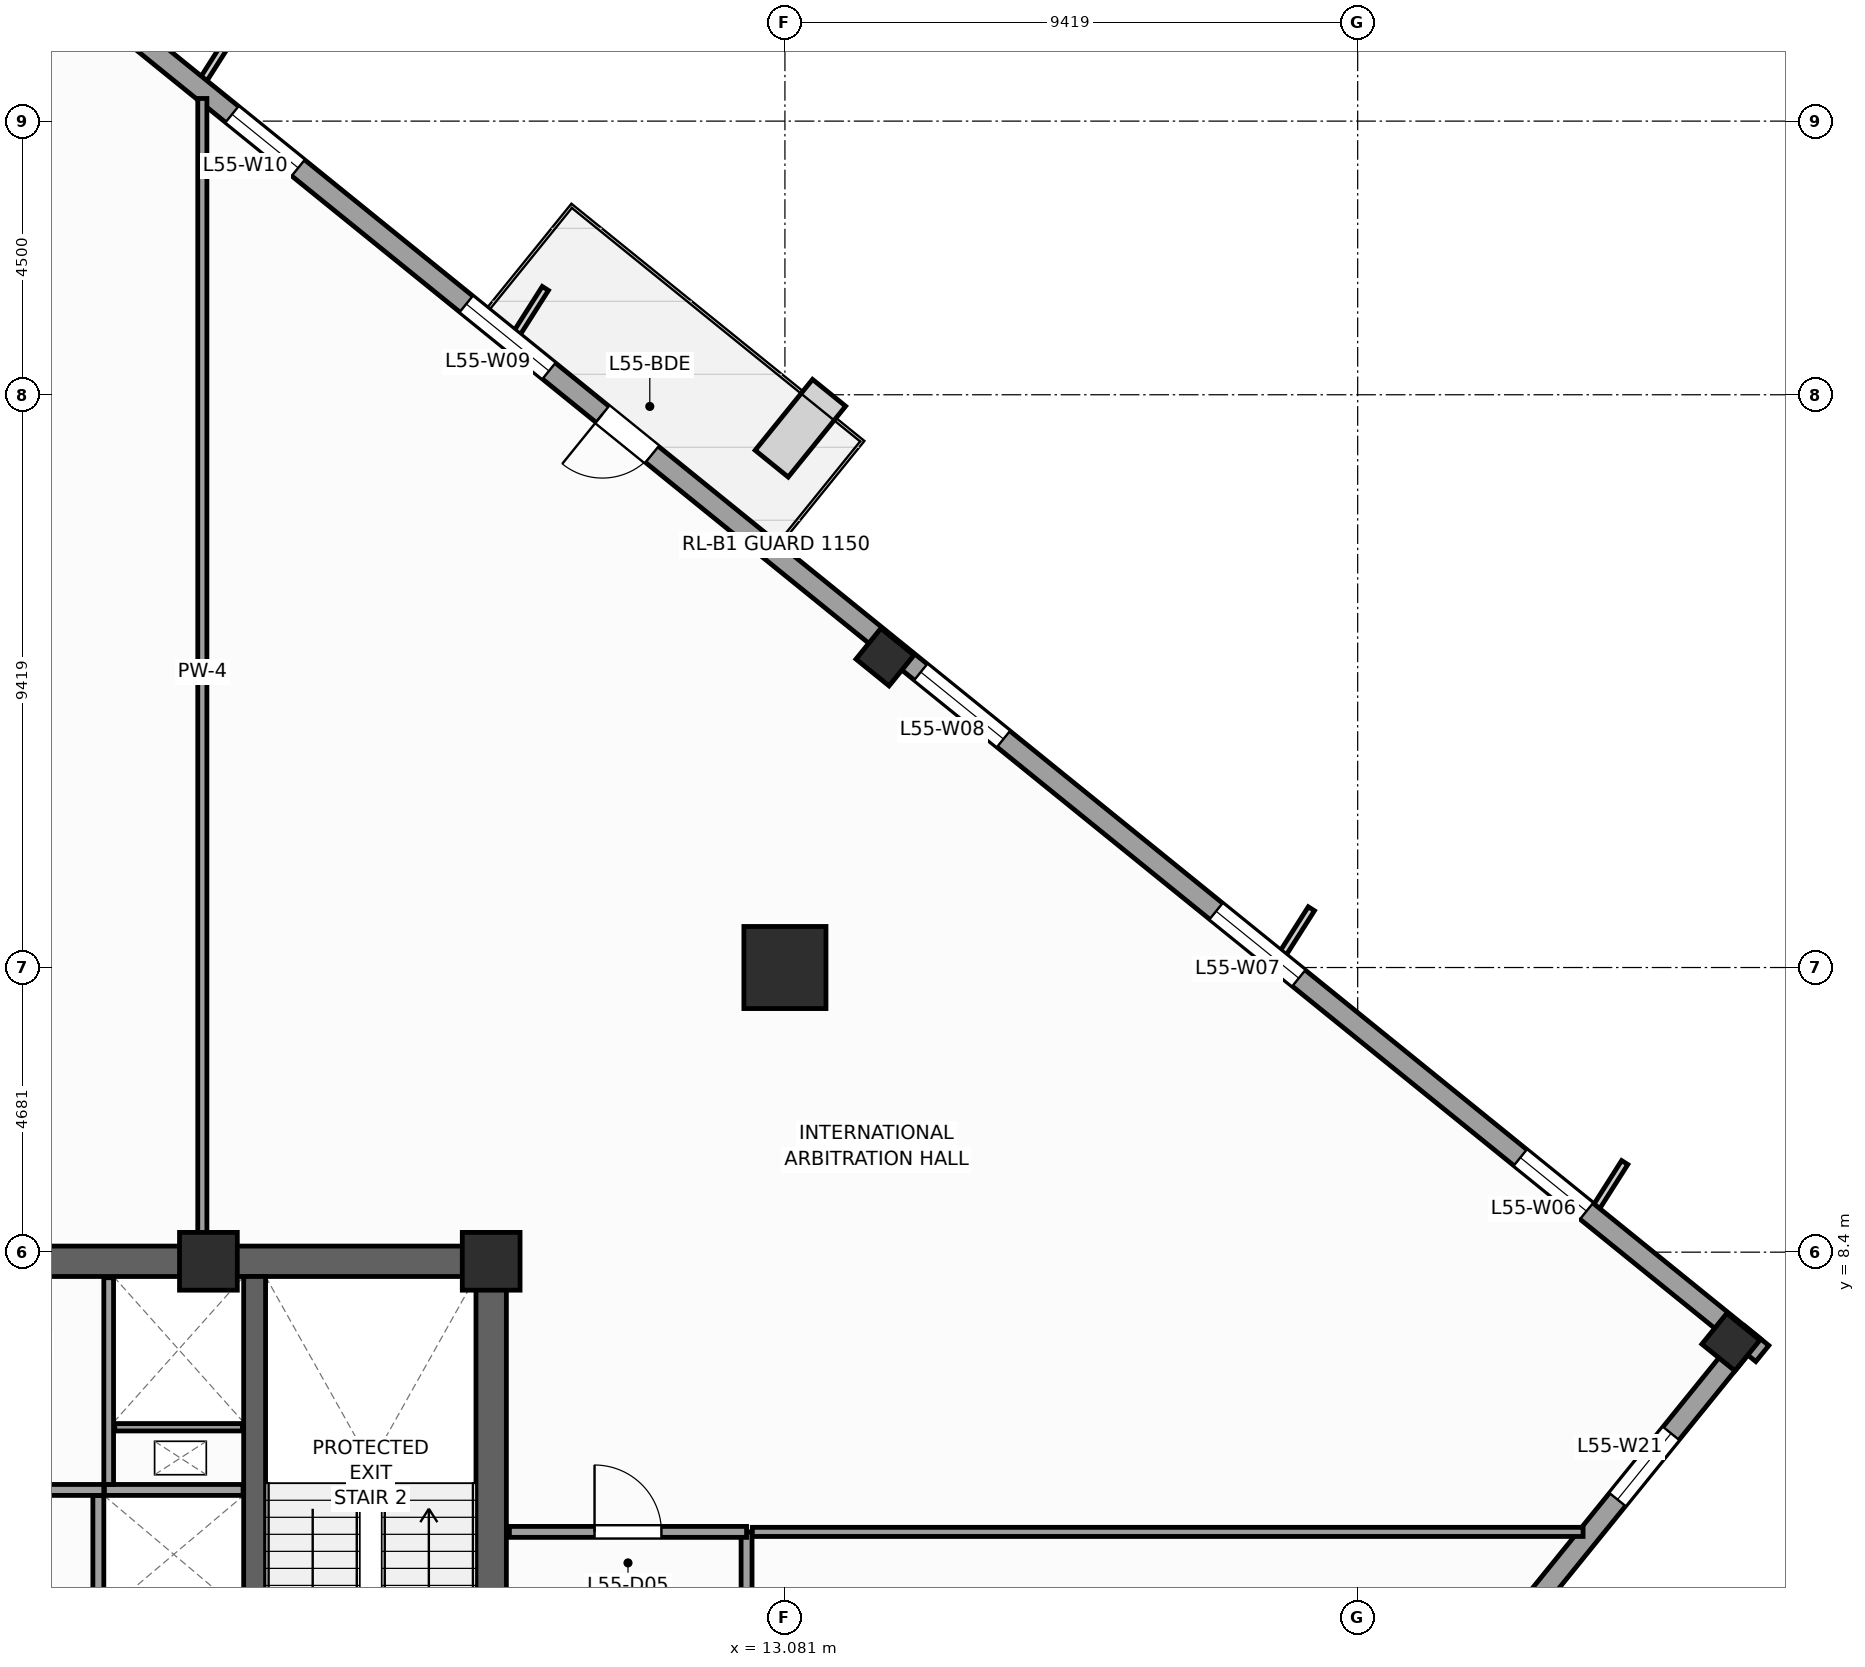
"""IFC4 building model, lengths in metres.
Left out: names, types, materials, properties, quantities, classifications, styles, units other than length and angle.
Written with IfcOpenShell. Run it as: python <this file> out.ifc"""

import sys

from ifc_helpers import new_model, si_unit, direction, frame, frame_2d, origin, origin_2d, place, context, subcontext, project, spatial, rectangle, extrude, source, transform, mapped, element, fill, save


model = new_model("IFC4")
c1 = context("Model", 3, precision=1e-05, world=origin(), true_north=direction((0.0, 1.0)))
c2 = subcontext(c1, "Body", "Model", "MODEL_VIEW")
j1 = project(units=[si_unit("LENGTHUNIT", "METRE"), si_unit("PLANEANGLEUNIT", "RADIAN")], contexts=[c1])
p1 = place(None, origin())
s1 = spatial("IfcSite", under=j1, at=p1, CompositionType="ELEMENT")
p2 = place(p1, origin())
s2 = spatial("IfcBuilding", under=s1, at=p2, CompositionType="ELEMENT")
p3 = place(p2, frame((0.0, 0.0, 229.0)))
s3 = spatial("IfcBuildingStorey", under=s2, at=p3, CompositionType="ELEMENT", Elevation=229.0)
p4 = place(p3, frame((-8.5, 8.25, 0.0), z_axis=(0.0, 0.0, 1.0), x_axis=(1.0, 0.0, 0.0)))
e1 = element("IfcWall", 1, at=p4, inside=s3, PredefinedType="SHEAR", context=c2, shape_type="SweptSolid", body=[
    extrude(rectangle(XDim=17.0, YDim=0.5, at=frame_2d((8.5, 0.0))), origin(), (0.0, 0.0, 1.0), 3.9),
])
p5 = place(p3, frame((8.25, -8.0, 0.0), z_axis=(0.0, 0.0, 1.0), x_axis=(0.0, 1.0, 0.0)))
e2 = element("IfcWall", 2, at=p5, inside=s3, PredefinedType="SHEAR", context=c2, shape_type="SweptSolid", body=[
    extrude(rectangle(XDim=16.0, YDim=0.5, at=frame_2d((8.0, 0.0))), origin(), (0.0, 0.0, 1.0), 3.9),
])
p6 = place(p5, frame((4.69, 0.0, 0.0)))
e3 = element("IfcOpeningElement", 3, at=p6, cuts=e2, PredefinedType="OPENING", context=c2, shape_type="SweptSolid", body=[
    extrude(rectangle(XDim=1.3, YDim=2.2, at=frame_2d((0.65, 1.1))), frame((0.0, 0.26, 0.0), z_axis=(0.0, -1.0, 0.0), x_axis=(1.0, 0.0, 0.0)), (0.0, 0.0, 1.0), 0.52),
])
p7 = place(p3, frame((4.36, -8.0, 0.0), z_axis=(0.0, 0.0, 1.0), x_axis=(0.0, 1.0, 0.0)))
e4 = element("IfcWall", 4, at=p7, inside=s3, PredefinedType="SHEAR", context=c2, shape_type="SweptSolid", body=[
    extrude(rectangle(XDim=16.0, YDim=0.36, at=frame_2d((8.0, 0.0))), origin(), (0.0, 0.0, 1.0), 3.9),
])
m1 = source(origin(), c2, "Body", "SweptSolid", [
    extrude(rectangle(XDim=0.95, YDim=0.95, at=origin_2d()), origin(), (0.0, 0.0, 1.0), 3.9),
])
for number, where, z_axis, x_axis in (
    (5, (8.25, 8.25, 0.0), (0.0, 0.0, 1.0), (1.0, 0.0, 0.0)),
    (6, (3.6, 8.25, 0.0), (0.0, 0.0, 1.0), (1.0, 0.0, 0.0)),
):
    element("IfcColumn", number, at=place(p3, frame(where, z_axis=z_axis, x_axis=x_axis)), inside=s3, PredefinedType="PILASTER", context=c2, shape_type="MappedRepresentation", body=[
        mapped(m1, transform((0.0, 0.0, 0.0), scale=1.0)),
    ])
m2 = source(origin(), c2, "Body", "SweptSolid", [
    extrude(rectangle(XDim=1.35, YDim=1.35, at=origin_2d()), origin(), (0.0, 0.0, 1.0), 3.9),
])
p8 = place(p3, frame((13.081, 13.081, 0.0), z_axis=(0.0, 0.0, 1.0), x_axis=(1.0, 0.0, 0.0)))
e7 = element("IfcColumn", 7, at=p8, inside=s3, PredefinedType="COLUMN", context=c2, shape_type="MappedRepresentation", body=[
    mapped(m2, transform((0.0, 0.0, 0.0), scale=1.0)),
])
m3 = source(origin(), c2, "Body", "SweptSolid", [
    extrude(rectangle(XDim=0.65, YDim=0.7, at=origin_2d()), origin(), (0.0, 0.0, 1.0), 3.9),
])
for number, where, z_axis, x_axis in (
    (8, (28.637, 6.92, 0.0), (0.0, 0.0, 1.0), (0.629, 0.777, 0.0)),
    (9, (14.726, 18.185, 0.0), (0.0, 0.0, 1.0), (0.629, 0.777, 0.0)),
):
    element("IfcColumn", number, at=place(p3, frame(where, z_axis=z_axis, x_axis=x_axis)), inside=s3, PredefinedType="COLUMN", context=c2, shape_type="MappedRepresentation", body=[
        mapped(m3, transform((0.0, 0.0, 0.0), scale=1.0)),
    ])
p9 = place(p3, frame((25.429, 2.673, 0.0), z_axis=(0.0, 0.0, 1.0), x_axis=(0.629299794138, 0.777162640055, 0.0)))
e10 = element("IfcWall", 10, at=p9, inside=s3, PredefinedType="STANDARD", context=c2, shape_type="SweptSolid", body=[
    extrude(rectangle(XDim=5.67, YDim=0.34, at=frame_2d((2.835, 0.0))), origin(), (0.0, 0.0, 1.0), 3.66),
])
p10 = place(p9, frame((2.135, 0.0, 0.48)))
e11 = element("IfcOpeningElement", 11, at=p10, cuts=e10, PredefinedType="OPENING", context=c2, shape_type="SweptSolid", body=[
    extrude(rectangle(XDim=1.4, YDim=2.4, at=frame_2d((0.7, 1.2))), frame((0.0, 0.18, 0.0), z_axis=(0.0, -1.0, 0.0), x_axis=(1.0, 0.0, 0.0)), (0.0, 0.0, 1.0), 0.36),
])
p11 = place(p3, frame((29.154, 6.733, 0.0), z_axis=(0.0, 0.0, 1.0), x_axis=(-0.77714192302, 0.629325378072, 0.0)))
e12 = element("IfcWall", 12, at=p11, inside=s3, PredefinedType="STANDARD", context=c2, shape_type="SweptSolid", body=[
    extrude(rectangle(XDim=36.84, YDim=0.34, at=frame_2d((18.42, 0.0))), origin(), (0.0, 0.0, 1.0), 2.96),
])
p12 = place(p11, frame((23.495, 0.0, 0.0)))
e13 = element("IfcOpeningElement", 13, at=p12, cuts=e12, PredefinedType="OPENING", context=c2, shape_type="SweptSolid", body=[
    extrude(rectangle(XDim=1.05, YDim=2.25, at=frame_2d((0.525, 1.125))), frame((0.0, 0.18, 0.0), z_axis=(0.0, -1.0, 0.0), x_axis=(1.0, 0.0, 0.0)), (0.0, 0.0, 1.0), 0.36),
])
p13 = place(p11, frame((3.721, 0.0, 0.48)))
e14 = element("IfcOpeningElement", 14, at=p13, cuts=e12, PredefinedType="OPENING", context=c2, shape_type="SweptSolid", body=[
    extrude(rectangle(XDim=1.4, YDim=2.4, at=frame_2d((0.7, 1.2))), frame((0.0, 0.18, 0.0), z_axis=(0.0, -1.0, 0.0), x_axis=(1.0, 0.0, 0.0)), (0.0, 0.0, 1.0), 0.36),
])
p14 = place(p11, frame((9.809, 0.0, 0.58)))
e15 = element("IfcOpeningElement", 15, at=p14, cuts=e12, PredefinedType="OPENING", context=c2, shape_type="SweptSolid", body=[
    extrude(rectangle(XDim=1.75, YDim=2.3, at=frame_2d((0.875, 1.15))), frame((0.0, 0.18, 0.0), z_axis=(0.0, -1.0, 0.0), x_axis=(1.0, 0.0, 0.0)), (0.0, 0.0, 1.0), 0.36),
])
p15 = place(p11, frame((16.058, 0.0, 0.58)))
e16 = element("IfcOpeningElement", 16, at=p15, cuts=e12, PredefinedType="OPENING", context=c2, shape_type="SweptSolid", body=[
    extrude(rectangle(XDim=1.75, YDim=2.3, at=frame_2d((0.875, 1.15))), frame((0.0, 0.18, 0.0), z_axis=(0.0, -1.0, 0.0), x_axis=(1.0, 0.0, 0.0)), (0.0, 0.0, 1.0), 0.36),
])
p16 = place(p11, frame((25.676, 0.0, 0.58)))
e17 = element("IfcOpeningElement", 17, at=p16, cuts=e12, PredefinedType="OPENING", context=c2, shape_type="SweptSolid", body=[
    extrude(rectangle(XDim=1.75, YDim=2.3, at=frame_2d((0.875, 1.15))), frame((0.0, 0.18, 0.0), z_axis=(0.0, -1.0, 0.0), x_axis=(1.0, 0.0, 0.0)), (0.0, 0.0, 1.0), 0.36),
])
p17 = place(p11, frame((30.982, 0.0, 0.48)))
e18 = element("IfcOpeningElement", 18, at=p17, cuts=e12, PredefinedType="OPENING", context=c2, shape_type="SweptSolid", body=[
    extrude(rectangle(XDim=1.4, YDim=2.4, at=frame_2d((0.7, 1.2))), frame((0.0, 0.18, 0.0), z_axis=(0.0, -1.0, 0.0), x_axis=(1.0, 0.0, 0.0)), (0.0, 0.0, 1.0), 0.36),
])
p18 = place(p3, frame((1.79, -7.98, 0.0), z_axis=(0.0, 0.0, 1.0), x_axis=(0.0, 1.0, 0.0)))
e19 = element("IfcWall", 19, at=p18, inside=s3, PredefinedType="PARTITIONING", context=c2, shape_type="SweptSolid", body=[
    extrude(rectangle(XDim=12.38, YDim=0.18, at=frame_2d((6.19, 0.0))), origin(), (0.0, 0.0, 1.0), 3.66),
])
p19 = place(p18, frame((4.6, 0.0, 0.0)))
e20 = element("IfcOpeningElement", 20, at=p19, cuts=e19, PredefinedType="OPENING", context=c2, shape_type="SweptSolid", body=[
    extrude(rectangle(XDim=1.1, YDim=2.2, at=frame_2d((0.55, 1.1))), frame((0.0, 0.1, 0.0), z_axis=(0.0, -1.0, 0.0), x_axis=(1.0, 0.0, 0.0)), (0.0, 0.0, 1.0), 0.2),
])
p20 = place(p18, frame((6.66, 0.0, 0.0)))
e21 = element("IfcOpeningElement", 21, at=p20, cuts=e19, PredefinedType="OPENING", context=c2, shape_type="SweptSolid", body=[
    extrude(rectangle(XDim=1.1, YDim=2.2, at=frame_2d((0.55, 1.1))), frame((0.0, 0.1, 0.0), z_axis=(0.0, -1.0, 0.0), x_axis=(1.0, 0.0, 0.0)), (0.0, 0.0, 1.0), 0.2),
])
p21 = place(p18, frame((0.35, 0.0, 0.0)))
e22 = element("IfcOpeningElement", 22, at=p21, cuts=e19, PredefinedType="OPENING", context=c2, shape_type="SweptSolid", body=[
    extrude(rectangle(XDim=0.88, YDim=2.1, at=frame_2d((0.44, 1.05))), frame((0.0, 0.1, 0.0), z_axis=(0.0, -1.0, 0.0), x_axis=(1.0, 0.0, 0.0)), (0.0, 0.0, 1.0), 0.2),
])
p22 = place(p18, frame((2.25, 0.0, 0.0)))
e23 = element("IfcOpeningElement", 23, at=p22, cuts=e19, PredefinedType="OPENING", context=c2, shape_type="SweptSolid", body=[
    extrude(rectangle(XDim=1.15, YDim=2.25, at=frame_2d((0.575, 1.125))), frame((0.0, 0.1, 0.0), z_axis=(0.0, -1.0, 0.0), x_axis=(1.0, 0.0, 0.0)), (0.0, 0.0, 1.0), 0.2),
])
p23 = place(p3, frame((-1.88, 4.49, 0.0), z_axis=(0.0, 0.0, 1.0), x_axis=(1.0, 0.0, 0.0)))
e24 = element("IfcWall", 24, at=p23, inside=s3, PredefinedType="PARTITIONING", context=c2, shape_type="SweptSolid", body=[
    extrude(rectangle(XDim=3.76, YDim=0.18, at=frame_2d((1.88, 0.0))), origin(), (0.0, 0.0, 1.0), 3.66),
])
p24 = place(p23, frame((1.305, 0.0, 0.0)))
e25 = element("IfcOpeningElement", 25, at=p24, cuts=e24, PredefinedType="OPENING", context=c2, shape_type="SweptSolid", body=[
    extrude(rectangle(XDim=1.15, YDim=2.25, at=frame_2d((0.575, 1.125))), frame((0.0, 0.1, 0.0), z_axis=(0.0, -1.0, 0.0), x_axis=(1.0, 0.0, 0.0)), (0.0, 0.0, 1.0), 0.2),
])
p25 = place(p3, frame((1.89, 4.49, 0.0), z_axis=(0.0, 0.0, 1.0), x_axis=(1.0, 0.0, 0.0)))
e26 = element("IfcWall", 26, at=p25, inside=s3, PredefinedType="PARTITIONING", context=c2, shape_type="SweptSolid", body=[
    extrude(rectangle(XDim=2.28, YDim=0.18, at=frame_2d((1.14, 0.0))), origin(), (0.0, 0.0, 1.0), 3.66),
])
p26 = place(p3, frame((1.96, 4.58, 0.0), z_axis=(0.0, 0.0, 1.0), x_axis=(0.0, 1.0, 0.0)))
e27 = element("IfcWall", 27, at=p26, inside=s3, PredefinedType="PARTITIONING", context=c2, shape_type="SweptSolid", body=[
    extrude(rectangle(XDim=3.4, YDim=0.16, at=frame_2d((1.7, 0.0))), origin(), (0.0, 0.0, 1.0), 3.66),
])
p27 = place(p3, frame((2.06, 5.52, 0.0), z_axis=(0.0, 0.0, 1.0), x_axis=(1.0, 0.0, 0.0)))
e28 = element("IfcWall", 28, at=p27, inside=s3, PredefinedType="PARTITIONING", context=c2, shape_type="SweptSolid", body=[
    extrude(rectangle(XDim=2.1, YDim=0.12, at=frame_2d((1.05, 0.0))), origin(), (0.0, 0.0, 1.0), 3.66),
])
p28 = place(p3, frame((12.45, -12.35, 0.0), z_axis=(0.0, 0.0, 1.0), x_axis=(0.0, 1.0, 0.0)))
e29 = element("IfcWall", 29, at=p28, inside=s3, PredefinedType="PARTITIONING", context=c2, shape_type="SweptSolid", body=[
    extrude(rectangle(XDim=16.15, YDim=0.18, at=frame_2d((8.075, 0.0))), origin(), (0.0, 0.0, 1.0), 3.66),
])
p29 = place(p28, frame((1.58, 0.0, 0.0)))
e30 = element("IfcOpeningElement", 30, at=p29, cuts=e29, PredefinedType="OPENING", context=c2, shape_type="SweptSolid", body=[
    extrude(rectangle(XDim=0.95, YDim=2.1, at=frame_2d((0.475, 1.05))), frame((0.0, 0.1, 0.0), z_axis=(0.0, -1.0, 0.0), x_axis=(1.0, 0.0, 0.0)), (0.0, 0.0, 1.0), 0.2),
])
p30 = place(p28, frame((14.111, 0.0, 0.0)))
e31 = element("IfcOpeningElement", 31, at=p30, cuts=e29, PredefinedType="OPENING", context=c2, shape_type="SweptSolid", body=[
    extrude(rectangle(XDim=1.1, YDim=2.2, at=frame_2d((0.55, 1.1))), frame((0.0, 0.1, 0.0), z_axis=(0.0, -1.0, 0.0), x_axis=(1.0, 0.0, 0.0)), (0.0, 0.0, 1.0), 0.2),
])
p31 = place(p28, frame((7.784, 0.0, 0.0)))
e32 = element("IfcOpeningElement", 32, at=p31, cuts=e29, PredefinedType="OPENING", context=c2, shape_type="SweptSolid", body=[
    extrude(rectangle(XDim=1.1, YDim=2.2, at=frame_2d((0.55, 1.1))), frame((0.0, 0.1, 0.0), z_axis=(0.0, -1.0, 0.0), x_axis=(1.0, 0.0, 0.0)), (0.0, 0.0, 1.0), 0.2),
])
p32 = place(p3, frame((8.55, 3.8, 0.0), z_axis=(0.0, 0.0, 1.0), x_axis=(1.0, 0.0, 0.0)))
e33 = element("IfcWall", 33, at=p32, inside=s3, PredefinedType="PARTITIONING", context=c2, shape_type="SweptSolid", body=[
    extrude(rectangle(XDim=3.9, YDim=0.18, at=frame_2d((1.95, 0.0))), origin(), (0.0, 0.0, 1.0), 3.66),
])
p33 = place(p32, frame((1.4, 0.0, 0.0)))
e34 = element("IfcOpeningElement", 34, at=p33, cuts=e33, PredefinedType="OPENING", context=c2, shape_type="SweptSolid", body=[
    extrude(rectangle(XDim=1.1, YDim=2.2, at=frame_2d((0.55, 1.1))), frame((0.0, 0.1, 0.0), z_axis=(0.0, -1.0, 0.0), x_axis=(1.0, 0.0, 0.0)), (0.0, 0.0, 1.0), 0.2),
])
p34 = place(p3, frame((3.5, 8.505, 0.0), z_axis=(0.0, 0.0, 1.0), x_axis=(0.0, 1.0, 0.0)))
e35 = element("IfcWall", 35, at=p34, inside=s3, PredefinedType="PARTITIONING", context=c2, shape_type="SweptSolid", body=[
    extrude(rectangle(XDim=18.868, YDim=0.15, at=frame_2d((9.434, 0.0))), origin(), (0.0, 0.0, 1.0), 3.66),
])
p35 = place(p3, frame((12.545, 3.8, 0.0), z_axis=(0.0, 0.0, 1.0), x_axis=(1.0, 0.0, 0.0)))
e36 = element("IfcWall", 36, at=p35, inside=s3, PredefinedType="PARTITIONING", context=c2, shape_type="SweptSolid", body=[
    extrude(rectangle(XDim=13.662, YDim=0.15, at=frame_2d((6.831, 0.0))), origin(), (0.0, 0.0, 1.0), 3.66),
])
m4 = source(origin(), c2, "Body", "SweptSolid", [
    extrude(rectangle(XDim=1.05, YDim=2.25, at=frame_2d((0.525, 1.125))), frame((0.0, 0.025, 0.0), z_axis=(0.0, -1.0, 0.0), x_axis=(1.0, 0.0, 0.0)), (0.0, 0.0, 1.0), 0.05),
])
p36 = place(p12, origin())
e37 = element("IfcDoor", 37, at=p36, inside=s3, OperationType="SINGLE_SWING_RIGHT", PredefinedType="DOOR", context=c2, shape_type="MappedRepresentation", body=[
    mapped(m4, transform((0.0, 0.0, 0.0), scale=1.0)),
])
fill(e13, e37)
m5 = source(origin(), c2, "Body", "SweptSolid", [
    extrude(rectangle(XDim=1.4, YDim=2.4, at=frame_2d((0.7, 1.2))), frame((0.0, 0.03, 0.0), z_axis=(0.0, -1.0, 0.0), x_axis=(1.0, 0.0, 0.0)), (0.0, 0.0, 1.0), 0.06),
])
p37 = place(p13, origin())
e38 = element("IfcWindow", 38, at=p37, inside=s3, PartitioningType="SINGLE_PANEL", PredefinedType="WINDOW", context=c2, shape_type="MappedRepresentation", body=[
    mapped(m5, transform((0.0, 0.0, 0.0), scale=1.0)),
])
fill(e14, e38)
m6 = source(origin(), c2, "Body", "SweptSolid", [
    extrude(rectangle(XDim=1.75, YDim=2.3, at=frame_2d((0.875, 1.15))), frame((0.0, 0.03, 0.0), z_axis=(0.0, -1.0, 0.0), x_axis=(1.0, 0.0, 0.0)), (0.0, 0.0, 1.0), 0.06),
])
p38 = place(p14, origin())
e39 = element("IfcWindow", 39, at=p38, inside=s3, PartitioningType="SINGLE_PANEL", PredefinedType="WINDOW", context=c2, shape_type="MappedRepresentation", body=[
    mapped(m6, transform((0.0, 0.0, 0.0), scale=1.0)),
])
fill(e15, e39)
p39 = place(p15, origin())
e40 = element("IfcWindow", 40, at=p39, inside=s3, PartitioningType="SINGLE_PANEL", PredefinedType="WINDOW", context=c2, shape_type="MappedRepresentation", body=[
    mapped(m6, transform((0.0, 0.0, 0.0), scale=1.0)),
])
fill(e16, e40)
p40 = place(p16, origin())
e41 = element("IfcWindow", 41, at=p40, inside=s3, PartitioningType="SINGLE_PANEL", PredefinedType="WINDOW", context=c2, shape_type="MappedRepresentation", body=[
    mapped(m6, transform((0.0, 0.0, 0.0), scale=1.0)),
])
fill(e17, e41)
p41 = place(p17, origin())
e42 = element("IfcWindow", 42, at=p41, inside=s3, PartitioningType="SINGLE_PANEL", PredefinedType="WINDOW", context=c2, shape_type="MappedRepresentation", body=[
    mapped(m5, transform((0.0, 0.0, 0.0), scale=1.0)),
])
fill(e18, e42)
p42 = place(p10, origin())
e43 = element("IfcWindow", 43, at=p42, inside=s3, PartitioningType="SINGLE_PANEL", PredefinedType="WINDOW", context=c2, shape_type="MappedRepresentation", body=[
    mapped(m5, transform((0.0, 0.0, 0.0), scale=1.0)),
])
fill(e11, e43)
m7 = source(origin(), c2, "Body", "SweptSolid", [
    extrude(rectangle(XDim=1.1, YDim=2.2, at=frame_2d((0.55, 1.1))), frame((0.0, 0.025, 0.0), z_axis=(0.0, -1.0, 0.0), x_axis=(1.0, 0.0, 0.0)), (0.0, 0.0, 1.0), 0.05),
])
p43 = place(p33, origin())
e44 = element("IfcDoor", 44, at=p43, inside=s3, OperationType="SINGLE_SWING_LEFT", PredefinedType="DOOR", context=c2, shape_type="MappedRepresentation", body=[
    mapped(m7, transform((0.0, 0.0, 0.0), scale=1.0)),
])
fill(e34, e44)
save(model, sys.argv[1])
